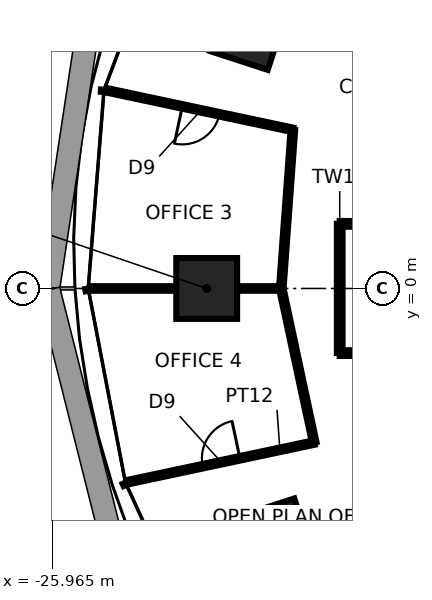
"""IFC4 building model, lengths in metres.
Left out: names, types, materials, properties, quantities, classifications, styles, units other than length and angle.
Written with IfcOpenShell. Run it as: python <this file> out.ifc"""

import sys

from ifc_helpers import new_model, si_unit, direction, frame, frame_2d, origin, origin_2d, place, context, subcontext, project, spatial, rectangle, extrude, element, fill, save


model = new_model("IFC4")
c1 = context("Model", 3, precision=1e-05, world=origin(), true_north=direction((0.0, 1.0)))
c2 = subcontext(c1, "Body", "Model", "MODEL_VIEW")
j1 = project(units=[si_unit("LENGTHUNIT", "METRE"), si_unit("PLANEANGLEUNIT", "RADIAN")], contexts=[c1])
p1 = place(None, origin())
s1 = spatial("IfcSite", under=j1, at=p1, CompositionType="ELEMENT")
p2 = place(p1, origin())
s2 = spatial("IfcBuilding", under=s1, at=p2, CompositionType="ELEMENT")
p3 = place(p2, frame((0.0, 0.0, 147.0)))
s3 = spatial("IfcBuildingStorey", under=s2, at=p3, CompositionType="ELEMENT", Elevation=147.0)
for number, where, z_axis, x_axis in (
    (1, (-20.808, 6.761, 0.0), (0.0, 0.0, 1.0), (-0.951, 0.309, 0.0)),
    (2, (-21.9, 0.0, 0.0), (0.0, 0.0, 1.0), (-1.0, 0.0, 0.0)),
    (3, (-20.109, -6.534, 0.0), (0.0, 0.0, 1.0), (-0.951, -0.309, 0.0)),
):
    element("IfcColumn", number, at=place(p3, frame(where, z_axis=z_axis, x_axis=x_axis)), inside=s3, PredefinedType="COLUMN", context=c2, shape_type="SweptSolid", body=[
        extrude(rectangle(XDim=1.6, YDim=1.6, at=origin_2d()), origin(), (0.0, 0.0, 1.0), 3.9),
    ])
p4 = place(p3, frame((-18.4, -1.7, 0.0), z_axis=(0.0, 0.0, 1.0), x_axis=(1.0, 0.0, 0.0)))
e4 = element("IfcWall", 4, at=p4, inside=s3, PredefinedType="PARTITIONING", context=c2, shape_type="SweptSolid", body=[
    extrude(rectangle(XDim=2.4, YDim=0.15, at=frame_2d((1.2, 0.0))), origin(), (0.0, 0.0, 1.0), 3.74),
])
p5 = place(p3, frame((-19.07, -4.053, 0.0), z_axis=(0.0, 0.0, 1.0), x_axis=(-0.209484846429, 0.977811893524, 0.0)))
e5 = element("IfcWall", 5, at=p5, inside=s3, PredefinedType="PARTITIONING", context=c2, shape_type="SweptSolid", body=[
    extrude(rectangle(XDim=4.146, YDim=0.12, at=frame_2d((2.073, 0.0))), origin(), (0.0, 0.0, 1.0), 3.74),
])
p6 = place(p3, frame((-23.96, -5.093, 0.0), z_axis=(0.0, 0.0, 1.0), x_axis=(0.978149046495, 0.207904888932, 0.0)))
e6 = element("IfcWall", 6, at=p6, inside=s3, PredefinedType="PARTITIONING", context=c2, shape_type="SweptSolid", body=[
    extrude(rectangle(XDim=5.0, YDim=0.12, at=frame_2d((2.5, 0.0))), origin(), (0.0, 0.0, 1.0), 3.74),
])
p7 = place(p6, frame((2.0, 0.0, 0.0)))
e7 = element("IfcOpeningElement", 7, at=p7, cuts=e6, PredefinedType="OPENING", context=c2, shape_type="SweptSolid", body=[
    extrude(rectangle(XDim=1.0, YDim=2.4, at=frame_2d((0.5, 1.2))), frame((0.0, 0.07, 0.0), z_axis=(0.0, -1.0, 0.0), x_axis=(1.0, 0.0, 0.0)), (0.0, 0.0, 1.0), 0.14),
])
p8 = place(p3, frame((-19.632, 4.173, 0.0), z_axis=(0.0, 0.0, 1.0), x_axis=(-0.978158975012, 0.207858171848, 0.0)))
e8 = element("IfcWall", 8, at=p8, inside=s3, PredefinedType="PARTITIONING", context=c2, shape_type="SweptSolid", body=[
    extrude(rectangle(XDim=5.0, YDim=0.12, at=frame_2d((2.5, 0.0))), origin(), (0.0, 0.0, 1.0), 3.74),
])
p9 = place(p8, frame((1.975, 0.0, 0.0)))
e9 = element("IfcOpeningElement", 9, at=p9, cuts=e8, PredefinedType="OPENING", context=c2, shape_type="SweptSolid", body=[
    extrude(rectangle(XDim=1.0, YDim=2.4, at=frame_2d((0.5, 1.2))), frame((0.0, 0.07, 0.0), z_axis=(0.0, -1.0, 0.0), x_axis=(1.0, 0.0, 0.0)), (0.0, 0.0, 1.0), 0.14),
])
p10 = place(p3, frame((-19.938, 0.0, 0.0), z_axis=(0.0, 0.0, 1.0), x_axis=(0.07310869627, 0.99732397872, 0.0)))
e10 = element("IfcWall", 10, at=p10, inside=s3, PredefinedType="PARTITIONING", context=c2, shape_type="SweptSolid", body=[
    extrude(rectangle(XDim=4.184, YDim=0.12, at=frame_2d((2.092, 0.0))), origin(), (0.0, 0.0, 1.0), 3.74),
])
p11 = place(p3, frame((-16.0, 1.7, 0.0), z_axis=(0.0, 0.0, 1.0), x_axis=(-1.0, 0.0, 0.0)))
e11 = element("IfcWall", 11, at=p11, inside=s3, PredefinedType="PARTITIONING", context=c2, shape_type="SweptSolid", body=[
    extrude(rectangle(XDim=2.4, YDim=0.15, at=frame_2d((1.2, 0.0))), origin(), (0.0, 0.0, 1.0), 3.74),
])
p12 = place(p3, frame((-19.938, 0.0, 0.0), z_axis=(0.0, 0.0, 1.0), x_axis=(-1.0, 0.0, 0.0)))
e12 = element("IfcWall", 12, at=p12, inside=s3, PredefinedType="PARTITIONING", context=c2, shape_type="SweptSolid", body=[
    extrude(rectangle(XDim=5.0, YDim=0.12, at=frame_2d((2.5, 0.0))), origin(), (0.0, 0.0, 1.0), 2.94),
])
p13 = place(p3, frame((-18.4, 1.7, 0.0), z_axis=(0.0, 0.0, 1.0), x_axis=(0.0, -1.0, 0.0)))
e13 = element("IfcWall", 13, at=p13, inside=s3, PredefinedType="PARTITIONING", context=c2, shape_type="SweptSolid", body=[
    extrude(rectangle(XDim=3.4, YDim=0.15, at=frame_2d((1.7, 0.0))), origin(), (0.0, 0.0, 1.0), 3.74),
])
p14 = place(p9, origin())
e14 = element("IfcDoor", 14, at=p14, inside=s3, OperationType="SINGLE_SWING_RIGHT", PredefinedType="DOOR", context=c2, shape_type="SweptSolid", body=[
    extrude(rectangle(XDim=1.0, YDim=2.4, at=frame_2d((0.5, 1.2))), frame((0.0, 0.025, 0.0), z_axis=(0.0, -1.0, 0.0), x_axis=(1.0, 0.0, 0.0)), (0.0, 0.0, 1.0), 0.05),
])
fill(e9, e14)
p15 = place(p7, origin())
e15 = element("IfcDoor", 15, at=p15, inside=s3, OperationType="SINGLE_SWING_RIGHT", PredefinedType="DOOR", context=c2, shape_type="SweptSolid", body=[
    extrude(rectangle(XDim=1.0, YDim=2.4, at=frame_2d((0.5, 1.2))), frame((0.0, 0.025, 0.0), z_axis=(0.0, -1.0, 0.0), x_axis=(1.0, 0.0, 0.0)), (0.0, 0.0, 1.0), 0.05),
])
fill(e7, e15)
save(model, sys.argv[1])
